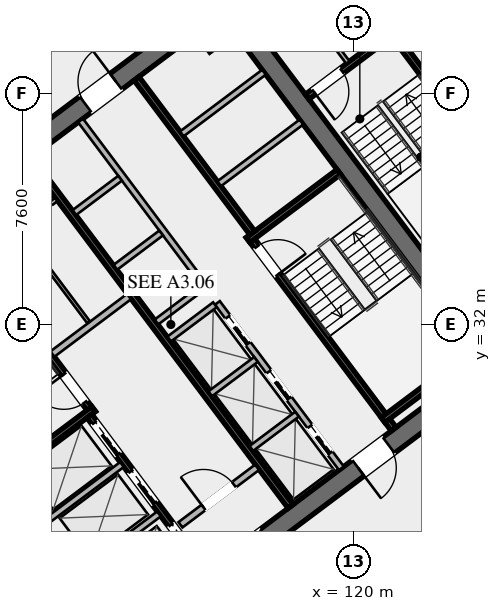
"""IFC4 building model, lengths in metres.
Left out: names, types, materials, properties, quantities, classifications, styles, units other than length and angle.
Written with IfcOpenShell. Run it as: python <this file> out.ifc"""

import sys

from ifc_helpers import new_model, si_unit, direction, frame, frame_2d, origin, place, context, subcontext, project, spatial, rectangle, extrude, element, fill, save


model = new_model("IFC4")
c1 = context("Model", 3, precision=1e-05, world=origin(), true_north=direction((0.0, 1.0)))
c2 = subcontext(c1, "Body", "Model", "MODEL_VIEW")
j1 = project(units=[si_unit("LENGTHUNIT", "METRE"), si_unit("PLANEANGLEUNIT", "RADIAN")], contexts=[c1])
p1 = place(None, origin())
s1 = spatial("IfcSite", under=j1, at=p1, CompositionType="ELEMENT")
p2 = place(p1, origin())
s2 = spatial("IfcBuilding", under=s1, at=p2, CompositionType="ELEMENT")
p3 = place(p2, frame((0.0, 0.0, 24.6)))
s3 = spatial("IfcBuildingStorey", under=s2, at=p3, CompositionType="ELEMENT", Elevation=24.6)
for number, where, z_axis, x_axis in (
    (1, (112.476, 21.107, 0.0), (0.0, 0.0, 1.0), (-0.6, 0.8, 0.0)),
    (2, (115.524, 42.893, 0.0), (0.0, 0.0, 1.0), (0.6, -0.8, 0.0)),
):
    element("IfcWall", number, at=place(p3, frame(where, z_axis=z_axis, x_axis=x_axis)), inside=s3, PredefinedType="SHEAR", context=c2, shape_type="SweptSolid", body=[
        extrude(rectangle(XDim=15.6, YDim=0.65, at=frame_2d((7.8, 0.0))), origin(), (0.0, 0.0, 1.0), 3.55),
    ])
p4 = place(p3, frame((124.429, 30.478, 0.0), z_axis=(0.0, 0.0, 1.0), x_axis=(-0.799998028465, -0.600002628705, 0.0)))
e3 = element("IfcWall", 3, at=p4, inside=s3, PredefinedType="SHEAR", context=c2, shape_type="SweptSolid", body=[
    extrude(rectangle(XDim=14.86, YDim=0.65, at=frame_2d((7.43, 0.0))), origin(), (0.0, 0.0, 1.0), 3.55),
])
p5 = place(p4, frame((9.13, 0.0, 0.0)))
e4 = element("IfcOpeningElement", 4, at=p5, cuts=e3, PredefinedType="OPENING", context=c2, shape_type="SweptSolid", body=[
    extrude(rectangle(XDim=1.25, YDim=2.25, at=frame_2d((0.625, 1.125))), frame((0.0, 0.335, 0.0), z_axis=(0.0, -1.0, 0.0), x_axis=(1.0, 0.0, 0.0)), (0.0, 0.0, 1.0), 0.67),
])
p6 = place(p4, frame((4.08, 0.0, 0.0)))
e5 = element("IfcOpeningElement", 5, at=p6, cuts=e3, PredefinedType="OPENING", context=c2, shape_type="SweptSolid", body=[
    extrude(rectangle(XDim=1.25, YDim=2.25, at=frame_2d((0.625, 1.125))), frame((0.0, 0.335, 0.0), z_axis=(0.0, -1.0, 0.0), x_axis=(1.0, 0.0, 0.0)), (0.0, 0.0, 1.0), 0.67),
])
p7 = place(p3, frame((103.571, 33.522, 0.0), z_axis=(0.0, 0.0, 1.0), x_axis=(0.799998028465, 0.600002628705, 0.0)))
e6 = element("IfcWall", 6, at=p7, inside=s3, PredefinedType="SHEAR", context=c2, shape_type="SweptSolid", body=[
    extrude(rectangle(XDim=14.86, YDim=0.65, at=frame_2d((7.43, 0.0))), origin(), (0.0, 0.0, 1.0), 3.55),
])
p8 = place(p7, frame((4.48, 0.0, 0.0)))
e7 = element("IfcOpeningElement", 7, at=p8, cuts=e6, PredefinedType="OPENING", context=c2, shape_type="SweptSolid", body=[
    extrude(rectangle(XDim=1.25, YDim=2.25, at=frame_2d((0.625, 1.125))), frame((0.0, 0.335, 0.0), z_axis=(0.0, -1.0, 0.0), x_axis=(1.0, 0.0, 0.0)), (0.0, 0.0, 1.0), 0.67),
])
p9 = place(p7, frame((9.53, 0.0, 0.0)))
e8 = element("IfcOpeningElement", 8, at=p9, cuts=e6, PredefinedType="OPENING", context=c2, shape_type="SweptSolid", body=[
    extrude(rectangle(XDim=1.25, YDim=2.25, at=frame_2d((0.625, 1.125))), frame((0.0, 0.335, 0.0), z_axis=(0.0, -1.0, 0.0), x_axis=(1.0, 0.0, 0.0)), (0.0, 0.0, 1.0), 0.67),
])
p10 = place(p3, frame((111.44, 29.08, 0.0), z_axis=(0.0, 0.0, 1.0), x_axis=(-0.600009827119, 0.799992629566, 0.0)))
e9 = element("IfcWall", 9, at=p10, inside=s3, PredefinedType="SHEAR", context=c2, shape_type="SweptSolid", body=[
    extrude(rectangle(XDim=7.95, YDim=0.2, at=frame_2d((3.975, 0.0))), origin(), (0.0, 0.0, 1.0), 3.35),
])
p11 = place(p10, frame((0.45, 0.0, 0.0)))
e10 = element("IfcOpeningElement", 10, at=p11, cuts=e9, PredefinedType="OPENING", context=c2, shape_type="SweptSolid", body=[
    extrude(rectangle(XDim=1.15, YDim=2.2, at=frame_2d((0.575, 1.1))), frame((0.0, 0.11, 0.0), z_axis=(0.0, -1.0, 0.0), x_axis=(1.0, 0.0, 0.0)), (0.0, 0.0, 1.0), 0.22),
])
p12 = place(p3, frame((108.476, 26.982, 0.0), z_axis=(0.0, 0.0, 1.0), x_axis=(0.799984290658, 0.600020945218, 0.0)))
e11 = element("IfcWall", 11, at=p12, inside=s3, PredefinedType="SHEAR", context=c2, shape_type="SweptSolid", body=[
    extrude(rectangle(XDim=3.73, YDim=0.2, at=frame_2d((1.865, 0.0))), origin(), (0.0, 0.0, 1.0), 3.35),
])
p13 = place(p3, frame((116.56, 34.92, 0.0), z_axis=(0.0, 0.0, 1.0), x_axis=(0.600009827119, -0.799992629566, 0.0)))
e12 = element("IfcWall", 12, at=p13, inside=s3, PredefinedType="SHEAR", context=c2, shape_type="SweptSolid", body=[
    extrude(rectangle(XDim=7.95, YDim=0.2, at=frame_2d((3.975, 0.0))), origin(), (0.0, 0.0, 1.0), 3.35),
])
p14 = place(p13, frame((0.45, 0.0, 0.0)))
e13 = element("IfcOpeningElement", 13, at=p14, cuts=e12, PredefinedType="OPENING", context=c2, shape_type="SweptSolid", body=[
    extrude(rectangle(XDim=1.15, YDim=2.2, at=frame_2d((0.575, 1.1))), frame((0.0, 0.11, 0.0), z_axis=(0.0, -1.0, 0.0), x_axis=(1.0, 0.0, 0.0)), (0.0, 0.0, 1.0), 0.22),
])
for number, where, z_axis, x_axis in (
    (14, (116.54, 34.78, 0.0), (0.0, 0.0, 1.0), (0.8, 0.6, 0.0)),
    (15, (120.98, 28.86, 0.0), (0.0, 0.0, 1.0), (0.8, 0.6, 0.0)),
):
    element("IfcWall", number, at=place(p3, frame(where, z_axis=z_axis, x_axis=x_axis)), inside=s3, PredefinedType="SHEAR", context=c2, shape_type="SweptSolid", body=[
        extrude(rectangle(XDim=3.73, YDim=0.2, at=frame_2d((1.865, 0.0))), origin(), (0.0, 0.0, 1.0), 3.35),
    ])
p15 = place(p3, frame((117.938, 26.016, 0.0), z_axis=(0.0, 0.0, 1.0), x_axis=(-0.600005463273, 0.799995902516, 0.0)))
e16 = element("IfcWall", 16, at=p15, inside=s3, PredefinedType="SHEAR", context=c2, shape_type="SweptSolid", body=[
    extrude(rectangle(XDim=14.3, YDim=0.2, at=frame_2d((7.15, 0.0))), origin(), (0.0, 0.0, 1.0), 3.35),
])
p16 = place(p3, frame((110.104, 31.028, 0.0), z_axis=(0.0, 0.0, 1.0), x_axis=(0.800018601094, 0.59997519774, 0.0)))
e17 = element("IfcWall", 17, at=p16, inside=s3, PredefinedType="SOLIDWALL", context=c2, shape_type="SweptSolid", body=[
    extrude(rectangle(XDim=3.15, YDim=0.22, at=frame_2d((1.575, 0.0))), origin(), (0.0, 0.0, 1.0), 2.703),
])
p17 = place(p3, frame((114.316, 25.412, 0.0), z_axis=(0.0, 0.0, 1.0), x_axis=(0.800018601094, 0.59997519774, 0.0)))
e18 = element("IfcWall", 18, at=p17, inside=s3, PredefinedType="SOLIDWALL", context=c2, shape_type="SweptSolid", body=[
    extrude(rectangle(XDim=3.15, YDim=0.22, at=frame_2d((1.575, 0.0))), origin(), (0.0, 0.0, 1.0), 2.703),
])
p18 = place(p17, frame((0.95, 0.0, 0.0)))
e19 = element("IfcOpeningElement", 19, at=p18, cuts=e18, PredefinedType="OPENING", context=c2, shape_type="SweptSolid", body=[
    extrude(rectangle(XDim=1.25, YDim=2.25, at=frame_2d((0.625, 1.125))), frame((0.0, 0.12, 0.0), z_axis=(0.0, -1.0, 0.0), x_axis=(1.0, 0.0, 0.0)), (0.0, 0.0, 1.0), 0.24),
])
p19 = place(p3, frame((115.13, 23.91, 0.0), z_axis=(0.0, 0.0, 1.0), x_axis=(-0.599975393228, 0.800018454488, 0.0)))
e20 = element("IfcWall", 20, at=p19, inside=s3, PredefinedType="SHEAR", context=c2, shape_type="SweptSolid", body=[
    extrude(rectangle(XDim=6.35, YDim=0.2, at=frame_2d((3.175, 0.0))), origin(), (0.0, 0.0, 1.0), 3.35),
])
p20 = place(p19, frame((4.775, 0.0, 0.0)))
e21 = element("IfcOpeningElement", 21, at=p20, cuts=e20, PredefinedType="OPENING", context=c2, shape_type="SweptSolid", body=[
    extrude(rectangle(XDim=1.3, YDim=2.25, at=frame_2d((0.65, 1.125))), frame((0.0, 0.11, 0.0), z_axis=(0.0, -1.0, 0.0), x_axis=(1.0, 0.0, 0.0)), (0.0, 0.0, 1.0), 0.22),
])
p21 = place(p19, frame((2.775, 0.0, 0.0)))
e22 = element("IfcOpeningElement", 22, at=p21, cuts=e20, PredefinedType="OPENING", context=c2, shape_type="SweptSolid", body=[
    extrude(rectangle(XDim=1.3, YDim=2.25, at=frame_2d((0.65, 1.125))), frame((0.0, 0.11, 0.0), z_axis=(0.0, -1.0, 0.0), x_axis=(1.0, 0.0, 0.0)), (0.0, 0.0, 1.0), 0.22),
])
p22 = place(p19, frame((0.575, 0.0, 0.0)))
e23 = element("IfcOpeningElement", 23, at=p22, cuts=e20, PredefinedType="OPENING", context=c2, shape_type="SweptSolid", body=[
    extrude(rectangle(XDim=1.3, YDim=2.25, at=frame_2d((0.65, 1.125))), frame((0.0, 0.11, 0.0), z_axis=(0.0, -1.0, 0.0), x_axis=(1.0, 0.0, 0.0)), (0.0, 0.0, 1.0), 0.22),
])
for number, where, z_axis, x_axis in (
    (24, (110.906, 23.742, 0.0), (0.0, 0.0, 1.0), (0.8, 0.6, 0.0)),
    (25, (109.688, 25.366, 0.0), (0.0, 0.0, 1.0), (0.8, 0.6, 0.0)),
):
    element("IfcWall", number, at=place(p3, frame(where, z_axis=z_axis, x_axis=x_axis)), inside=s3, PredefinedType="SOLIDWALL", context=c2, shape_type="SweptSolid", body=[
        extrude(rectangle(XDim=3.38, YDim=0.2, at=frame_2d((1.69, 0.0))), origin(), (0.0, 0.0, 1.0), 3.35),
    ])
p23 = place(p3, frame((112.87, 40.09, 0.0), z_axis=(0.0, 0.0, 1.0), x_axis=(0.599975393228, -0.800018454488, 0.0)))
e26 = element("IfcWall", 26, at=p23, inside=s3, PredefinedType="SHEAR", context=c2, shape_type="SweptSolid", body=[
    extrude(rectangle(XDim=6.35, YDim=0.2, at=frame_2d((3.175, 0.0))), origin(), (0.0, 0.0, 1.0), 3.35),
])
for number, where, z_axis, x_axis in (
    (27, (115.59, 36.63, 0.0), (0.0, 0.0, 1.0), (0.8, 0.6, 0.0)),
    (28, (114.36, 38.27, 0.0), (0.0, 0.0, 1.0), (0.8, 0.6, 0.0)),
):
    element("IfcWall", number, at=place(p3, frame(where, z_axis=z_axis, x_axis=x_axis)), inside=s3, PredefinedType="SOLIDWALL", context=c2, shape_type="SweptSolid", body=[
        extrude(rectangle(XDim=3.38, YDim=0.2, at=frame_2d((1.69, 0.0))), origin(), (0.0, 0.0, 1.0), 3.35),
    ])
p24 = place(p3, frame((107.71, 34.22, 0.0), z_axis=(0.0, 0.0, 1.0), x_axis=(0.799981399002, 0.60002480053, 0.0)))
e29 = element("IfcWall", 29, at=p24, inside=s3, PredefinedType="PARTITIONING", context=c2, shape_type="SweptSolid", body=[
    extrude(rectangle(XDim=3.15, YDim=0.135, at=frame_2d((1.575, 0.0))), origin(), (0.0, 0.0, 1.0), 2.703),
])
p25 = place(p24, frame((0.25, 0.0, 0.0)))
e30 = element("IfcOpeningElement", 30, at=p25, cuts=e29, PredefinedType="OPENING", context=c2, shape_type="SweptSolid", body=[
    extrude(rectangle(XDim=0.95, YDim=2.05, at=frame_2d((0.475, 1.025))), frame((0.0, 0.077, 0.0), z_axis=(0.0, -1.0, 0.0), x_axis=(1.0, 0.0, 0.0)), (0.0, 0.0, 1.0), 0.155),
])
p26 = place(p24, frame((1.95, 0.0, 0.0)))
e31 = element("IfcOpeningElement", 31, at=p26, cuts=e29, PredefinedType="OPENING", context=c2, shape_type="SweptSolid", body=[
    extrude(rectangle(XDim=0.95, YDim=2.05, at=frame_2d((0.475, 1.025))), frame((0.0, 0.077, 0.0), z_axis=(0.0, -1.0, 0.0), x_axis=(1.0, 0.0, 0.0)), (0.0, 0.0, 1.0), 0.155),
])
p27 = place(p3, frame((111.296, 32.072, 0.0), z_axis=(0.0, 0.0, 1.0), x_axis=(-0.59995887973, 0.800030838552, 0.0)))
e32 = element("IfcWall", 32, at=p27, inside=s3, PredefinedType="PARTITIONING", context=c2, shape_type="SweptSolid", body=[
    extrude(rectangle(XDim=3.8, YDim=0.11, at=frame_2d((1.9, 0.0))), origin(), (0.0, 0.0, 1.0), 2.703),
])
p28 = place(p3, frame((119.61, 27.27, 0.0), z_axis=(0.0, 0.0, 1.0), x_axis=(-0.600011488909, 0.79999138319, 0.0)))
e33 = element("IfcWall", 33, at=p28, inside=s3, PredefinedType="SOLIDWALL", context=c2, shape_type="SweptSolid", body=[
    extrude(rectangle(XDim=6.8, YDim=0.2, at=frame_2d((3.4, 0.0))), origin(), (0.0, 0.0, 1.0), 3.35),
])
p29 = place(p28, frame((0.625, 0.0, 0.0)))
e34 = element("IfcOpeningElement", 34, at=p29, cuts=e33, PredefinedType="OPENING", context=c2, shape_type="SweptSolid", body=[
    extrude(rectangle(XDim=1.1, YDim=2.2, at=frame_2d((0.55, 1.1))), frame((0.0, 0.11, 0.0), z_axis=(0.0, -1.0, 0.0), x_axis=(1.0, 0.0, 0.0)), (0.0, 0.0, 1.0), 0.22),
])
p30 = place(p28, frame((2.875, 0.0, 0.0)))
e35 = element("IfcOpeningElement", 35, at=p30, cuts=e33, PredefinedType="OPENING", context=c2, shape_type="SweptSolid", body=[
    extrude(rectangle(XDim=1.1, YDim=2.2, at=frame_2d((0.55, 1.1))), frame((0.0, 0.11, 0.0), z_axis=(0.0, -1.0, 0.0), x_axis=(1.0, 0.0, 0.0)), (0.0, 0.0, 1.0), 0.22),
])
p31 = place(p28, frame((5.125, 0.0, 0.0)))
e36 = element("IfcOpeningElement", 36, at=p31, cuts=e33, PredefinedType="OPENING", context=c2, shape_type="SweptSolid", body=[
    extrude(rectangle(XDim=1.1, YDim=2.2, at=frame_2d((0.55, 1.1))), frame((0.0, 0.11, 0.0), z_axis=(0.0, -1.0, 0.0), x_axis=(1.0, 0.0, 0.0)), (0.0, 0.0, 1.0), 0.22),
])
p32 = place(p3, frame((116.646, 27.922, 0.0), z_axis=(0.0, 0.0, 1.0), x_axis=(0.8, 0.6, 0.0)))
e37 = element("IfcWall", 37, at=p32, inside=s3, PredefinedType="SOLIDWALL", context=c2, shape_type="SweptSolid", body=[
    extrude(rectangle(XDim=1.88, YDim=0.2, at=frame_2d((0.94, 0.0))), origin(), (0.0, 0.0, 1.0), 3.35),
])
p33 = place(p3, frame((115.296, 29.722, 0.0), z_axis=(0.0, 0.0, 1.0), x_axis=(0.799984418148, 0.600020775241, 0.0)))
e38 = element("IfcWall", 38, at=p33, inside=s3, PredefinedType="SOLIDWALL", context=c2, shape_type="SweptSolid", body=[
    extrude(rectangle(XDim=1.88, YDim=0.2, at=frame_2d((0.94, 0.0))), origin(), (0.0, 0.0, 1.0), 3.35),
])
p34 = place(p3, frame((113.946, 31.522, 0.0), z_axis=(0.0, 0.0, 1.0), x_axis=(0.8, 0.6, 0.0)))
e39 = element("IfcWall", 39, at=p34, inside=s3, PredefinedType="SOLIDWALL", context=c2, shape_type="SweptSolid", body=[
    extrude(rectangle(XDim=1.88, YDim=0.2, at=frame_2d((0.94, 0.0))), origin(), (0.0, 0.0, 1.0), 3.35),
])
p35 = place(p3, frame((115.11, 33.27, 0.0), z_axis=(0.0, 0.0, 1.0), x_axis=(-0.600011488909, 0.79999138319, 0.0)))
e40 = element("IfcWall", 40, at=p35, inside=s3, PredefinedType="SOLIDWALL", context=c2, shape_type="SweptSolid", body=[
    extrude(rectangle(XDim=6.8, YDim=0.2, at=frame_2d((3.4, 0.0))), origin(), (0.0, 0.0, 1.0), 3.35),
])
p36 = place(p3, frame((113.526, 32.082, 0.0), z_axis=(0.0, 0.0, 1.0), x_axis=(0.800046745961, 0.599937666993, 0.0)))
e41 = element("IfcWall", 41, at=p36, inside=s3, PredefinedType="SOLIDWALL", context=c2, shape_type="SweptSolid", body=[
    extrude(rectangle(XDim=1.88, YDim=0.2, at=frame_2d((0.94, 0.0))), origin(), (0.0, 0.0, 1.0), 3.35),
])
p37 = place(p3, frame((112.176, 33.882, 0.0), z_axis=(0.0, 0.0, 1.0), x_axis=(0.8, 0.6, 0.0)))
e42 = element("IfcWall", 42, at=p37, inside=s3, PredefinedType="SOLIDWALL", context=c2, shape_type="SweptSolid", body=[
    extrude(rectangle(XDim=1.88, YDim=0.2, at=frame_2d((0.94, 0.0))), origin(), (0.0, 0.0, 1.0), 3.35),
])
p38 = place(p3, frame((110.826, 35.682, 0.0), z_axis=(0.0, 0.0, 1.0), x_axis=(0.799984418148, 0.600020775241, 0.0)))
e43 = element("IfcWall", 43, at=p38, inside=s3, PredefinedType="SOLIDWALL", context=c2, shape_type="SweptSolid", body=[
    extrude(rectangle(XDim=1.88, YDim=0.2, at=frame_2d((0.94, 0.0))), origin(), (0.0, 0.0, 1.0), 3.35),
])
p39 = place(p3, frame((125.304, 36.228, 0.0), z_axis=(0.0, 0.0, 1.0), x_axis=(-0.59998851072, 0.800008616831, 0.0)))
e44 = element("IfcWall", 44, at=p39, inside=s3, PredefinedType="SHEAR", context=c2, shape_type="SweptSolid", body=[
    extrude(rectangle(XDim=6.8, YDim=0.2, at=frame_2d((3.4, 0.0))), origin(), (0.0, 0.0, 1.0), 3.35),
])
p40 = place(p3, frame((121.204, 41.528, 0.0), z_axis=(0.0, 0.0, 1.0), x_axis=(-0.800017232136, -0.599977023131, 0.0)))
e45 = element("IfcWall", 45, at=p40, inside=s3, PredefinedType="SHEAR", context=c2, shape_type="SweptSolid", body=[
    extrude(rectangle(XDim=3.4, YDim=0.2, at=frame_2d((1.7, 0.0))), origin(), (0.0, 0.0, 1.0), 3.35),
])
p41 = place(p40, frame((1.975, 0.0, 0.0)))
e46 = element("IfcOpeningElement", 46, at=p41, cuts=e45, PredefinedType="OPENING", context=c2, shape_type="SweptSolid", body=[
    extrude(rectangle(XDim=1.15, YDim=2.2, at=frame_2d((0.575, 1.1))), frame((0.0, 0.11, 0.0), z_axis=(0.0, -1.0, 0.0), x_axis=(1.0, 0.0, 0.0)), (0.0, 0.0, 1.0), 0.22),
])
p42 = place(p3, frame((119.824, 40.618, 0.0), z_axis=(0.0, 0.0, 1.0), x_axis=(-0.599982243973, 0.800013316712, 0.0)))
e47 = element("IfcWall", 47, at=p42, inside=s3, PredefinedType="PARTITIONING", context=c2, shape_type="SweptSolid", body=[
    extrude(rectangle(XDim=4.4, YDim=0.135, at=frame_2d((2.2, 0.0))), origin(), (0.0, 0.0, 1.0), 2.703),
])
p43 = place(p3, frame((98.516, 34.012, 0.0), z_axis=(0.0, 0.0, 1.0), x_axis=(0.799998035726, 0.600002619023, 0.0)))
e48 = element("IfcWall", 48, at=p43, inside=s3, PredefinedType="PARTITIONING", context=c2, shape_type="SweptSolid", body=[
    extrude(rectangle(XDim=29.83, YDim=0.135, at=frame_2d((14.915, 0.0))), origin(), (0.0, 0.0, 1.0), 2.703),
])
p44 = place(p43, frame((0.3, 0.0, 0.0)))
e49 = element("IfcOpeningElement", 49, at=p44, cuts=e48, PredefinedType="OPENING", context=c2, shape_type="SweptSolid", body=[
    extrude(rectangle(XDim=0.95, YDim=2.05, at=frame_2d((0.475, 1.025))), frame((0.0, 0.077, 0.0), z_axis=(0.0, -1.0, 0.0), x_axis=(1.0, 0.0, 0.0)), (0.0, 0.0, 1.0), 0.155),
])
p45 = place(p43, frame((10.829, 0.0, 0.0)))
e50 = element("IfcOpeningElement", 50, at=p45, cuts=e48, PredefinedType="OPENING", context=c2, shape_type="SweptSolid", body=[
    extrude(rectangle(XDim=0.95, YDim=2.05, at=frame_2d((0.475, 1.025))), frame((0.0, 0.077, 0.0), z_axis=(0.0, -1.0, 0.0), x_axis=(1.0, 0.0, 0.0)), (0.0, 0.0, 1.0), 0.155),
])
p46 = place(p43, frame((28.58, 0.0, 0.0)))
e51 = element("IfcOpeningElement", 51, at=p46, cuts=e48, PredefinedType="OPENING", context=c2, shape_type="SweptSolid", body=[
    extrude(rectangle(XDim=0.95, YDim=2.05, at=frame_2d((0.475, 1.025))), frame((0.0, 0.077, 0.0), z_axis=(0.0, -1.0, 0.0), x_axis=(1.0, 0.0, 0.0)), (0.0, 0.0, 1.0), 0.155),
])
p47 = place(p3, frame((135.46, 34.47, 0.0), z_axis=(0.0, 0.0, 1.0), x_axis=(-0.800000982127, -0.599998690494, 0.0)))
e52 = element("IfcWall", 52, at=p47, inside=s3, PredefinedType="PARTITIONING", context=c2, shape_type="SweptSolid", body=[
    extrude(rectangle(XDim=29.83, YDim=0.135, at=frame_2d((14.915, 0.0))), origin(), (0.0, 0.0, 1.0), 2.703),
])
p48 = place(p47, frame((28.5, 0.0, 0.0)))
e53 = element("IfcOpeningElement", 53, at=p48, cuts=e52, PredefinedType="OPENING", context=c2, shape_type="SweptSolid", body=[
    extrude(rectangle(XDim=0.95, YDim=2.05, at=frame_2d((0.475, 1.025))), frame((0.0, 0.077, 0.0), z_axis=(0.0, -1.0, 0.0), x_axis=(1.0, 0.0, 0.0)), (0.0, 0.0, 1.0), 0.155),
])
p49 = place(p47, frame((18.075, 0.0, 0.0)))
e54 = element("IfcOpeningElement", 54, at=p49, cuts=e52, PredefinedType="OPENING", context=c2, shape_type="SweptSolid", body=[
    extrude(rectangle(XDim=0.95, YDim=2.05, at=frame_2d((0.475, 1.025))), frame((0.0, 0.077, 0.0), z_axis=(0.0, -1.0, 0.0), x_axis=(1.0, 0.0, 0.0)), (0.0, 0.0, 1.0), 0.155),
])
p50 = place(p47, frame((0.38, 0.0, 0.0)))
e55 = element("IfcOpeningElement", 55, at=p50, cuts=e52, PredefinedType="OPENING", context=c2, shape_type="SweptSolid", body=[
    extrude(rectangle(XDim=0.95, YDim=2.05, at=frame_2d((0.475, 1.025))), frame((0.0, 0.077, 0.0), z_axis=(0.0, -1.0, 0.0), x_axis=(1.0, 0.0, 0.0)), (0.0, 0.0, 1.0), 0.155),
])
p51 = place(p3, frame((111.548, 16.636, 0.0), z_axis=(0.0, 0.0, 1.0), x_axis=(-0.600003610192, 0.799997292343, 0.0)))
e56 = element("IfcWall", 56, at=p51, inside=s3, PredefinedType="PARTITIONING", context=c2, shape_type="SweptSolid", body=[
    extrude(rectangle(XDim=21.64, YDim=0.135, at=frame_2d((10.82, 0.0))), origin(), (0.0, 0.0, 1.0), 2.703),
])
p52 = place(p51, frame((0.3, 0.0, 0.0)))
e57 = element("IfcOpeningElement", 57, at=p52, cuts=e56, PredefinedType="OPENING", context=c2, shape_type="SweptSolid", body=[
    extrude(rectangle(XDim=0.95, YDim=2.05, at=frame_2d((0.475, 1.025))), frame((0.0, 0.077, 0.0), z_axis=(0.0, -1.0, 0.0), x_axis=(1.0, 0.0, 0.0)), (0.0, 0.0, 1.0), 0.155),
])
p53 = place(p9, origin())
e58 = element("IfcDoor", 58, at=p53, inside=s3, OperationType="SINGLE_SWING_RIGHT", PredefinedType="DOOR", context=c2, shape_type="SweptSolid", body=[
    extrude(rectangle(XDim=1.25, YDim=2.25, at=frame_2d((0.625, 1.125))), frame((0.0, 0.025, 0.0), z_axis=(0.0, -1.0, 0.0), x_axis=(1.0, 0.0, 0.0)), (0.0, 0.0, 1.0), 0.05),
])
fill(e8, e58)
p54 = place(p6, origin())
e59 = element("IfcDoor", 59, at=p54, inside=s3, OperationType="SINGLE_SWING_RIGHT", PredefinedType="DOOR", context=c2, shape_type="SweptSolid", body=[
    extrude(rectangle(XDim=1.25, YDim=2.25, at=frame_2d((0.625, 1.125))), frame((0.0, 0.025, 0.0), z_axis=(0.0, -1.0, 0.0), x_axis=(1.0, 0.0, 0.0)), (0.0, 0.0, 1.0), 0.05),
])
fill(e5, e59)
p55 = place(p11, origin())
e60 = element("IfcDoor", 60, at=p55, inside=s3, OperationType="SINGLE_SWING_RIGHT", PredefinedType="DOOR", context=c2, shape_type="SweptSolid", body=[
    extrude(rectangle(XDim=1.15, YDim=2.2, at=frame_2d((0.575, 1.1))), frame((0.0, 0.025, 0.0), z_axis=(0.0, -1.0, 0.0), x_axis=(1.0, 0.0, 0.0)), (0.0, 0.0, 1.0), 0.05),
])
fill(e10, e60)
p56 = place(p14, origin())
e61 = element("IfcDoor", 61, at=p56, inside=s3, OperationType="SINGLE_SWING_RIGHT", PredefinedType="DOOR", context=c2, shape_type="SweptSolid", body=[
    extrude(rectangle(XDim=1.15, YDim=2.2, at=frame_2d((0.575, 1.1))), frame((0.0, 0.025, 0.0), z_axis=(0.0, -1.0, 0.0), x_axis=(1.0, 0.0, 0.0)), (0.0, 0.0, 1.0), 0.05),
])
fill(e13, e61)
p57 = place(p18, origin())
e62 = element("IfcDoor", 62, at=p57, inside=s3, OperationType="SINGLE_SWING_LEFT", PredefinedType="DOOR", context=c2, shape_type="SweptSolid", body=[
    extrude(rectangle(XDim=1.25, YDim=2.25, at=frame_2d((0.625, 1.125))), frame((0.0, 0.025, 0.0), z_axis=(0.0, -1.0, 0.0), x_axis=(1.0, 0.0, 0.0)), (0.0, 0.0, 1.0), 0.05),
])
fill(e19, e62)
p58 = place(p41, origin())
e63 = element("IfcDoor", 63, at=p58, inside=s3, OperationType="SINGLE_SWING_RIGHT", PredefinedType="DOOR", context=c2, shape_type="SweptSolid", body=[
    extrude(rectangle(XDim=1.15, YDim=2.2, at=frame_2d((0.575, 1.1))), frame((0.0, 0.025, 0.0), z_axis=(0.0, -1.0, 0.0), x_axis=(1.0, 0.0, 0.0)), (0.0, 0.0, 1.0), 0.05),
])
fill(e46, e63)
p59 = place(p20, origin())
e64 = element("IfcDoor", 64, at=p59, inside=s3, OperationType="SLIDING_TO_LEFT", PredefinedType="DOOR", context=c2, shape_type="SweptSolid", body=[
    extrude(rectangle(XDim=1.3, YDim=2.25, at=frame_2d((0.65, 1.125))), frame((0.0, 0.025, 0.0), z_axis=(0.0, -1.0, 0.0), x_axis=(1.0, 0.0, 0.0)), (0.0, 0.0, 1.0), 0.05),
])
fill(e21, e64)
p60 = place(p21, origin())
e65 = element("IfcDoor", 65, at=p60, inside=s3, OperationType="SLIDING_TO_LEFT", PredefinedType="DOOR", context=c2, shape_type="SweptSolid", body=[
    extrude(rectangle(XDim=1.3, YDim=2.25, at=frame_2d((0.65, 1.125))), frame((0.0, 0.025, 0.0), z_axis=(0.0, -1.0, 0.0), x_axis=(1.0, 0.0, 0.0)), (0.0, 0.0, 1.0), 0.05),
])
fill(e22, e65)
p61 = place(p22, origin())
e66 = element("IfcDoor", 66, at=p61, inside=s3, OperationType="SLIDING_TO_LEFT", PredefinedType="DOOR", context=c2, shape_type="SweptSolid", body=[
    extrude(rectangle(XDim=1.3, YDim=2.25, at=frame_2d((0.65, 1.125))), frame((0.0, 0.025, 0.0), z_axis=(0.0, -1.0, 0.0), x_axis=(1.0, 0.0, 0.0)), (0.0, 0.0, 1.0), 0.05),
])
fill(e23, e66)
p62 = place(p29, origin())
e67 = element("IfcDoor", 67, at=p62, inside=s3, OperationType="SLIDING_TO_LEFT", PredefinedType="DOOR", context=c2, shape_type="SweptSolid", body=[
    extrude(rectangle(XDim=1.1, YDim=2.2, at=frame_2d((0.55, 1.1))), frame((0.0, 0.025, 0.0), z_axis=(0.0, -1.0, 0.0), x_axis=(1.0, 0.0, 0.0)), (0.0, 0.0, 1.0), 0.05),
])
fill(e34, e67)
p63 = place(p30, origin())
e68 = element("IfcDoor", 68, at=p63, inside=s3, OperationType="SLIDING_TO_LEFT", PredefinedType="DOOR", context=c2, shape_type="SweptSolid", body=[
    extrude(rectangle(XDim=1.1, YDim=2.2, at=frame_2d((0.55, 1.1))), frame((0.0, 0.025, 0.0), z_axis=(0.0, -1.0, 0.0), x_axis=(1.0, 0.0, 0.0)), (0.0, 0.0, 1.0), 0.05),
])
fill(e35, e68)
p64 = place(p31, origin())
e69 = element("IfcDoor", 69, at=p64, inside=s3, OperationType="SLIDING_TO_LEFT", PredefinedType="DOOR", context=c2, shape_type="SweptSolid", body=[
    extrude(rectangle(XDim=1.1, YDim=2.2, at=frame_2d((0.55, 1.1))), frame((0.0, 0.025, 0.0), z_axis=(0.0, -1.0, 0.0), x_axis=(1.0, 0.0, 0.0)), (0.0, 0.0, 1.0), 0.05),
])
fill(e36, e69)
save(model, sys.argv[1])
